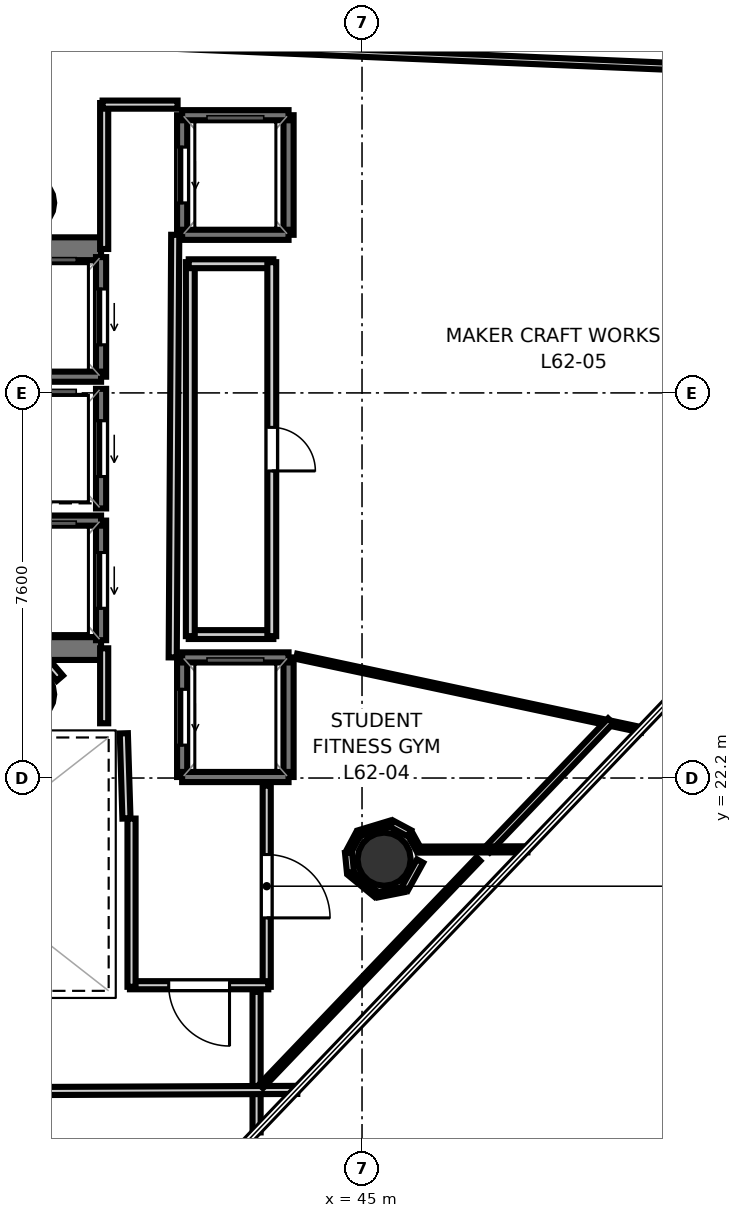
"""IFC4 building model, lengths in metres.
Left out: names, types, materials, properties, quantities, classifications, styles, units other than length and angle.
Written with IfcOpenShell. Run it as: python <this file> out.ifc"""

import sys

from ifc_helpers import new_model, si_unit, direction, frame, frame_2d, origin, origin_2d, place, context, subcontext, project, spatial, rectangle, hollow_circle, extrude, element, fill, save


model = new_model("IFC4")
c1 = context("Model", 3, precision=1e-05, world=origin(), true_north=direction((0.0, 1.0)))
c2 = subcontext(c1, "Body", "Model", "MODEL_VIEW")
j1 = project(units=[si_unit("LENGTHUNIT", "METRE"), si_unit("PLANEANGLEUNIT", "RADIAN")], contexts=[c1])
p1 = place(None, origin())
s1 = spatial("IfcSite", under=j1, at=p1, CompositionType="ELEMENT")
p2 = place(p1, origin())
s2 = spatial("IfcBuilding", under=s1, at=p2, CompositionType="ELEMENT")
p3 = place(p2, frame((0.0, 0.0, 242.7)))
s3 = spatial("IfcBuildingStorey", under=s2, at=p3, CompositionType="ELEMENT", Elevation=242.7)
p4 = place(p3, frame((29.33, 32.645, 0.0), z_axis=(0.0, 0.0, 1.0), x_axis=(1.0, 0.0, 0.0)))
e1 = element("IfcWall", 1, at=p4, inside=s3, PredefinedType="SHEAR", context=c2, shape_type="SweptSolid", body=[
    extrude(rectangle(XDim=10.52, YDim=0.45, at=frame_2d((5.26, 0.0))), origin(), (0.0, 0.0, 1.0), 3.52),
])
p5 = place(p4, frame((0.895, 0.0, 0.0)))
e2 = element("IfcOpeningElement", 2, at=p5, cuts=e1, PredefinedType="OPENING", context=c2, shape_type="SweptSolid", body=[
    extrude(rectangle(XDim=1.25, YDim=2.15, at=frame_2d((0.625, 1.075))), frame((0.0, 0.235, 0.0), z_axis=(0.0, -1.0, 0.0), x_axis=(1.0, 0.0, 0.0)), (0.0, 0.0, 1.0), 0.47),
])
p6 = place(p3, frame((29.33, 24.755, 0.0), z_axis=(0.0, 0.0, 1.0), x_axis=(1.0, 0.0, 0.0)))
e3 = element("IfcWall", 3, at=p6, inside=s3, PredefinedType="SHEAR", context=c2, shape_type="SweptSolid", body=[
    extrude(rectangle(XDim=10.52, YDim=0.45, at=frame_2d((5.26, 0.0))), origin(), (0.0, 0.0, 1.0), 3.52),
])
p7 = place(p6, frame((0.695, 0.0, 0.0)))
e4 = element("IfcOpeningElement", 4, at=p7, cuts=e3, PredefinedType="OPENING", context=c2, shape_type="SweptSolid", body=[
    extrude(rectangle(XDim=1.25, YDim=2.15, at=frame_2d((0.625, 1.075))), frame((0.0, 0.235, 0.0), z_axis=(0.0, -1.0, 0.0), x_axis=(1.0, 0.0, 0.0)), (0.0, 0.0, 1.0), 0.47),
])
for number, where, z_axis, x_axis in (
    (5, (38.4, 33.55, 0.0), (0.0, 0.0, 1.0), (1.0, 0.0, 0.0)),
    (6, (38.4, 23.85, 0.0), (0.0, 0.0, 1.0), (1.0, 0.0, 0.0)),
    (7, (45.436, 20.598, 0.0), (0.0, 0.0, 1.0), (1.0, 0.0, 0.0)),
):
    element("IfcColumn", number, at=place(p3, frame(where, z_axis=z_axis, x_axis=x_axis)), inside=s3, PredefinedType="COLUMN", context=c2, shape_type="SweptSolid", body=[
        extrude(hollow_circle(Radius=0.525, WallThickness=0.028, at=origin_2d()), origin(), (0.0, 0.0, 1.0), 3.7),
    ])
p8 = place(p3, frame((39.85, 30.12, 0.0), z_axis=(0.0, 0.0, 1.0), x_axis=(0.0, 1.0, 0.0)))
e8 = element("IfcWall", 8, at=p8, inside=s3, PredefinedType="SOLIDWALL", context=c2, shape_type="SweptSolid", body=[
    extrude(rectangle(XDim=2.36, YDim=0.2, at=frame_2d((1.18, 0.0))), origin(), (0.0, 0.0, 1.0), 3.52),
])
p9 = place(p8, frame((0.63, 0.0, 0.0)))
e9 = element("IfcOpeningElement", 9, at=p9, cuts=e8, PredefinedType="OPENING", context=c2, shape_type="SweptSolid", body=[
    extrude(rectangle(XDim=1.1, YDim=2.15, at=frame_2d((0.55, 1.075))), frame((0.0, 0.11, 0.0), z_axis=(0.0, -1.0, 0.0), x_axis=(1.0, 0.0, 0.0)), (0.0, 0.0, 1.0), 0.22),
])
p10 = place(p3, frame((37.75, 30.12, 0.0), z_axis=(0.0, 0.0, 1.0), x_axis=(1.0, 0.0, 0.0)))
e10 = element("IfcWall", 10, at=p10, inside=s3, PredefinedType="SOLIDWALL", context=c2, shape_type="SweptSolid", body=[
    extrude(rectangle(XDim=2.1, YDim=0.2, at=frame_2d((1.05, 0.0))), origin(), (0.0, 0.0, 1.0), 3.52),
])
p11 = place(p3, frame((39.85, 24.92, 0.0), z_axis=(0.0, 0.0, 1.0), x_axis=(0.0, 1.0, 0.0)))
e11 = element("IfcWall", 11, at=p11, inside=s3, PredefinedType="SOLIDWALL", context=c2, shape_type="SweptSolid", body=[
    extrude(rectangle(XDim=2.36, YDim=0.2, at=frame_2d((1.18, 0.0))), origin(), (0.0, 0.0, 1.0), 3.52),
])
p12 = place(p11, frame((0.63, 0.0, 0.0)))
e12 = element("IfcOpeningElement", 12, at=p12, cuts=e11, PredefinedType="OPENING", context=c2, shape_type="SweptSolid", body=[
    extrude(rectangle(XDim=1.1, YDim=2.15, at=frame_2d((0.55, 1.075))), frame((0.0, 0.11, 0.0), z_axis=(0.0, -1.0, 0.0), x_axis=(1.0, 0.0, 0.0)), (0.0, 0.0, 1.0), 0.22),
])
p13 = place(p3, frame((37.75, 27.28, 0.0), z_axis=(0.0, 0.0, 1.0), x_axis=(1.0, 0.0, 0.0)))
e13 = element("IfcWall", 13, at=p13, inside=s3, PredefinedType="SOLIDWALL", context=c2, shape_type="SweptSolid", body=[
    extrude(rectangle(XDim=2.1, YDim=0.2, at=frame_2d((1.05, 0.0))), origin(), (0.0, 0.0, 1.0), 3.52),
])
p14 = place(p3, frame((39.85, 27.52, 0.0), z_axis=(0.0, 0.0, 1.0), x_axis=(0.0, 1.0, 0.0)))
e14 = element("IfcWall", 14, at=p14, inside=s3, PredefinedType="SOLIDWALL", context=c2, shape_type="SweptSolid", body=[
    extrude(rectangle(XDim=2.36, YDim=0.2, at=frame_2d((1.18, 0.0))), origin(), (0.0, 0.0, 1.0), 3.52),
])
p15 = place(p14, frame((0.63, 0.0, 0.0)))
e15 = element("IfcOpeningElement", 15, at=p15, cuts=e14, PredefinedType="OPENING", context=c2, shape_type="SweptSolid", body=[
    extrude(rectangle(XDim=1.1, YDim=2.15, at=frame_2d((0.55, 1.075))), frame((0.0, 0.11, 0.0), z_axis=(0.0, -1.0, 0.0), x_axis=(1.0, 0.0, 0.0)), (0.0, 0.0, 1.0), 0.22),
])
p16 = place(p3, frame((43.55, 22.22, 0.0), z_axis=(0.0, 0.0, 1.0), x_axis=(0.0, 1.0, 0.0)))
e16 = element("IfcWall", 16, at=p16, inside=s3, PredefinedType="SOLIDWALL", context=c2, shape_type="SweptSolid", body=[
    extrude(rectangle(XDim=2.36, YDim=0.2, at=frame_2d((1.18, 0.0))), origin(), (0.0, 0.0, 1.0), 3.52),
])
p17 = place(p3, frame((41.45, 22.22, 0.0), z_axis=(0.0, 0.0, 1.0), x_axis=(0.0, 1.0, 0.0)))
e17 = element("IfcWall", 17, at=p17, inside=s3, PredefinedType="SOLIDWALL", context=c2, shape_type="SweptSolid", body=[
    extrude(rectangle(XDim=2.36, YDim=0.2, at=frame_2d((1.18, 0.0))), origin(), (0.0, 0.0, 1.0), 3.52),
])
p18 = place(p17, frame((0.63, 0.0, 0.0)))
e18 = element("IfcOpeningElement", 18, at=p18, cuts=e17, PredefinedType="OPENING", context=c2, shape_type="SweptSolid", body=[
    extrude(rectangle(XDim=1.1, YDim=2.15, at=frame_2d((0.55, 1.075))), frame((0.0, 0.11, 0.0), z_axis=(0.0, -1.0, 0.0), x_axis=(1.0, 0.0, 0.0)), (0.0, 0.0, 1.0), 0.22),
])
for number, where, z_axis, x_axis in (
    (19, (41.45, 24.58, 0.0), (0.0, 0.0, 1.0), (1.0, 0.0, 0.0)),
    (20, (41.45, 22.22, 0.0), (0.0, 0.0, 1.0), (1.0, 0.0, 0.0)),
):
    element("IfcWall", number, at=place(p3, frame(where, z_axis=z_axis, x_axis=x_axis)), inside=s3, PredefinedType="SOLIDWALL", context=c2, shape_type="SweptSolid", body=[
        extrude(rectangle(XDim=2.1, YDim=0.2, at=frame_2d((1.05, 0.0))), origin(), (0.0, 0.0, 1.0), 3.52),
    ])
p19 = place(p3, frame((43.55, 32.92, 0.0), z_axis=(0.0, 0.0, 1.0), x_axis=(0.0, 1.0, 0.0)))
e21 = element("IfcWall", 21, at=p19, inside=s3, PredefinedType="SOLIDWALL", context=c2, shape_type="SweptSolid", body=[
    extrude(rectangle(XDim=2.36, YDim=0.2, at=frame_2d((1.18, 0.0))), origin(), (0.0, 0.0, 1.0), 3.52),
])
p20 = place(p3, frame((41.45, 32.92, 0.0), z_axis=(0.0, 0.0, 1.0), x_axis=(0.0, 1.0, 0.0)))
e22 = element("IfcWall", 22, at=p20, inside=s3, PredefinedType="SOLIDWALL", context=c2, shape_type="SweptSolid", body=[
    extrude(rectangle(XDim=2.36, YDim=0.2, at=frame_2d((1.18, 0.0))), origin(), (0.0, 0.0, 1.0), 3.52),
])
p21 = place(p20, frame((0.63, 0.0, 0.0)))
e23 = element("IfcOpeningElement", 23, at=p21, cuts=e22, PredefinedType="OPENING", context=c2, shape_type="SweptSolid", body=[
    extrude(rectangle(XDim=1.1, YDim=2.15, at=frame_2d((0.55, 1.075))), frame((0.0, 0.11, 0.0), z_axis=(0.0, -1.0, 0.0), x_axis=(1.0, 0.0, 0.0)), (0.0, 0.0, 1.0), 0.22),
])
for number, where, z_axis, x_axis in (
    (24, (41.45, 35.28, 0.0), (0.0, 0.0, 1.0), (1.0, 0.0, 0.0)),
    (25, (41.45, 32.92, 0.0), (0.0, 0.0, 1.0), (1.0, 0.0, 0.0)),
):
    element("IfcWall", number, at=place(p3, frame(where, z_axis=z_axis, x_axis=x_axis)), inside=s3, PredefinedType="SOLIDWALL", context=c2, shape_type="SweptSolid", body=[
        extrude(rectangle(XDim=2.1, YDim=0.2, at=frame_2d((1.05, 0.0))), origin(), (0.0, 0.0, 1.0), 3.52),
    ])
p22 = place(p3, frame((40.351, 21.401, 0.0), z_axis=(0.0, 0.0, 1.0), x_axis=(-0.031058045979, 0.999517582527, 0.0)))
e26 = element("IfcWall", 26, at=p22, inside=s3, PredefinedType="PARTITIONING", context=c2, shape_type="SweptSolid", body=[
    extrude(rectangle(XDim=1.682, YDim=0.16, at=frame_2d((0.841, 0.0))), origin(), (0.0, 0.0, 1.0), 2.84),
])
p23 = place(p3, frame((39.911, 23.28, 0.0), z_axis=(0.0, 0.0, 1.0), x_axis=(0.0, 1.0, 0.0)))
e27 = element("IfcWall", 27, at=p23, inside=s3, PredefinedType="PARTITIONING", context=c2, shape_type="SweptSolid", body=[
    extrude(rectangle(XDim=1.48, YDim=0.16, at=frame_2d((0.74, 0.0))), origin(), (0.0, 0.0, 1.0), 2.84),
])
p24 = place(p3, frame((39.911, 32.64, 0.0), z_axis=(0.0, 0.0, 1.0), x_axis=(0.0, 1.0, 0.0)))
e28 = element("IfcWall", 28, at=p24, inside=s3, PredefinedType="PARTITIONING", context=c2, shape_type="SweptSolid", body=[
    extrude(rectangle(XDim=2.88, YDim=0.16, at=frame_2d((1.44, 0.0))), origin(), (0.0, 0.0, 1.0), 2.84),
])
p25 = place(p3, frame((39.88, 35.489, 0.0), z_axis=(0.0, 0.0, 1.0), x_axis=(1.0, 0.0, 0.0)))
e29 = element("IfcWall", 29, at=p25, inside=s3, PredefinedType="PARTITIONING", context=c2, shape_type="SweptSolid", body=[
    extrude(rectangle(XDim=1.48, YDim=0.16, at=frame_2d((0.74, 0.0))), origin(), (0.0, 0.0, 1.0), 2.84),
])
p26 = place(p3, frame((41.313, 32.92, 0.0), z_axis=(0.0, 0.0, 1.0), x_axis=(-0.005942518022, -0.999982343084, 0.0)))
e30 = element("IfcWall", 30, at=p26, inside=s3, PredefinedType="PARTITIONING", context=c2, shape_type="SweptSolid", body=[
    extrude(rectangle(XDim=8.34, YDim=0.16, at=frame_2d((4.17, 0.0))), origin(), (0.0, 0.0, 1.0), 2.84),
])
p27 = place(p3, frame((43.119, 22.05, 0.0), z_axis=(0.0, 0.0, 1.0), x_axis=(0.0, -1.0, 0.0)))
e31 = element("IfcWall", 31, at=p27, inside=s3, PredefinedType="PARTITIONING", context=c2, shape_type="SweptSolid", body=[
    extrude(rectangle(XDim=3.97, YDim=0.16, at=frame_2d((1.985, 0.0))), origin(), (0.0, 0.0, 1.0), 2.84),
])
p28 = place(p27, frame((1.36, 0.0, 0.0)))
e32 = element("IfcOpeningElement", 32, at=p28, cuts=e31, PredefinedType="OPENING", context=c2, shape_type="SweptSolid", body=[
    extrude(rectangle(XDim=1.25, YDim=2.2, at=frame_2d((0.625, 1.1))), frame((0.0, 0.09, 0.0), z_axis=(0.0, -1.0, 0.0), x_axis=(1.0, 0.0, 0.0)), (0.0, 0.0, 1.0), 0.18),
])
p29 = place(p3, frame((43.15, 18.111, 0.0), z_axis=(0.0, 0.0, 1.0), x_axis=(-1.0, 0.0, 0.0)))
e33 = element("IfcWall", 33, at=p29, inside=s3, PredefinedType="PARTITIONING", context=c2, shape_type="SweptSolid", body=[
    extrude(rectangle(XDim=2.73, YDim=0.16, at=frame_2d((1.365, 0.0))), origin(), (0.0, 0.0, 1.0), 2.84),
])
p30 = place(p29, frame((0.765, 0.0, 0.0)))
e34 = element("IfcOpeningElement", 34, at=p30, cuts=e33, PredefinedType="OPENING", context=c2, shape_type="SweptSolid", body=[
    extrude(rectangle(XDim=1.2, YDim=2.15, at=frame_2d((0.6, 1.075))), frame((0.0, 0.09, 0.0), z_axis=(0.0, -1.0, 0.0), x_axis=(1.0, 0.0, 0.0)), (0.0, 0.0, 1.0), 0.18),
])
p31 = place(p3, frame((40.451, 18.08, 0.0), z_axis=(0.0, 0.0, 1.0), x_axis=(0.0, 1.0, 0.0)))
e35 = element("IfcWall", 35, at=p31, inside=s3, PredefinedType="PARTITIONING", context=c2, shape_type="SweptSolid", body=[
    extrude(rectangle(XDim=3.32, YDim=0.16, at=frame_2d((1.66, 0.0))), origin(), (0.0, 0.0, 1.0), 2.84),
])
p32 = place(p3, frame((43.25, 25.031, 0.0), z_axis=(0.0, 0.0, 1.0), x_axis=(-1.0, 0.0, 0.0)))
e36 = element("IfcWall", 36, at=p32, inside=s3, PredefinedType="PLUMBINGWALL", context=c2, shape_type="SweptSolid", body=[
    extrude(rectangle(XDim=1.67, YDim=0.175, at=frame_2d((0.835, 0.0))), origin(), (0.0, 0.0, 1.0), 2.84),
])
p33 = place(p3, frame((41.611, 25.0, 0.0), z_axis=(0.0, 0.0, 1.0), x_axis=(0.0, 1.0, 0.0)))
e37 = element("IfcWall", 37, at=p33, inside=s3, PredefinedType="PLUMBINGWALL", context=c2, shape_type="SweptSolid", body=[
    extrude(rectangle(XDim=7.38, YDim=0.175, at=frame_2d((3.69, 0.0))), origin(), (0.0, 0.0, 1.0), 2.84),
])
p34 = place(p3, frame((41.58, 32.349, 0.0), z_axis=(0.0, 0.0, 1.0), x_axis=(1.0, 0.0, 0.0)))
e38 = element("IfcWall", 38, at=p34, inside=s3, PredefinedType="PLUMBINGWALL", context=c2, shape_type="SweptSolid", body=[
    extrude(rectangle(XDim=1.67, YDim=0.175, at=frame_2d((0.835, 0.0))), origin(), (0.0, 0.0, 1.0), 2.84),
])
p35 = place(p3, frame((43.219, 32.38, 0.0), z_axis=(0.0, 0.0, 1.0), x_axis=(0.0, -1.0, 0.0)))
e39 = element("IfcWall", 39, at=p35, inside=s3, PredefinedType="PLUMBINGWALL", context=c2, shape_type="SweptSolid", body=[
    extrude(rectangle(XDim=7.38, YDim=0.175, at=frame_2d((3.69, 0.0))), origin(), (0.0, 0.0, 1.0), 2.84),
])
p36 = place(p35, frame((3.26, 0.0, 0.0)))
e40 = element("IfcOpeningElement", 40, at=p36, cuts=e39, PredefinedType="OPENING", context=c2, shape_type="SweptSolid", body=[
    extrude(rectangle(XDim=0.86, YDim=2.05, at=frame_2d((0.43, 1.025))), frame((0.0, 0.097, 0.0), z_axis=(0.0, -1.0, 0.0), x_axis=(1.0, 0.0, 0.0)), (0.0, 0.0, 1.0), 0.195),
])
p37 = place(p3, frame((39.036, 24.17, 0.0), z_axis=(0.0, 0.0, 1.0), x_axis=(-0.652260263346, 0.757995084984, 0.0)))
e41 = element("IfcWall", 41, at=p37, inside=s3, PredefinedType="PARTITIONING", context=c2, shape_type="SweptSolid", body=[
    extrude(rectangle(XDim=0.355, YDim=0.16, at=frame_2d((0.178, 0.0))), origin(), (0.0, 0.0, 1.0), 2.84),
])
p38 = place(p3, frame((42.919, 17.98, 0.0), z_axis=(0.0, 0.0, 1.0), x_axis=(0.0, -1.0, 0.0)))
e42 = element("IfcWall", 42, at=p38, inside=s3, PredefinedType="PARTITIONING", context=c2, shape_type="SweptSolid", body=[
    extrude(rectangle(XDim=2.774, YDim=0.16, at=frame_2d((1.387, 0.0))), origin(), (0.0, 0.0, 1.0), 2.84),
])
p39 = place(p3, frame((43.722, 16.045, 0.0), z_axis=(0.0, 0.0, 1.0), x_axis=(-0.999990917582, -0.004262012887, 0.0)))
e43 = element("IfcWall", 43, at=p39, inside=s3, PredefinedType="PARTITIONING", context=c2, shape_type="SweptSolid", body=[
    extrude(rectangle(XDim=15.123, YDim=0.16, at=frame_2d((7.562, 0.0))), origin(), (0.0, 0.0, 1.0), 2.84),
])
p40 = place(p39, frame((12.611, 0.0, 0.0)))
e44 = element("IfcOpeningElement", 44, at=p40, cuts=e43, PredefinedType="OPENING", context=c2, shape_type="SweptSolid", body=[
    extrude(rectangle(XDim=1.25, YDim=2.2, at=frame_2d((0.625, 1.1))), frame((0.0, 0.09, 0.0), z_axis=(0.0, -1.0, 0.0), x_axis=(1.0, 0.0, 0.0)), (0.0, 0.0, 1.0), 0.18),
])
p41 = place(p39, frame((6.314, 0.0, 0.0)))
e45 = element("IfcOpeningElement", 45, at=p41, cuts=e43, PredefinedType="OPENING", context=c2, shape_type="SweptSolid", body=[
    extrude(rectangle(XDim=1.25, YDim=2.2, at=frame_2d((0.625, 1.1))), frame((0.0, 0.09, 0.0), z_axis=(0.0, -1.0, 0.0), x_axis=(1.0, 0.0, 0.0)), (0.0, 0.0, 1.0), 0.18),
])
p42 = place(p3, frame((43.71, 24.601, 0.0), z_axis=(0.0, 0.0, 1.0), x_axis=(0.978027062603, -0.208477972017, 0.0)))
e46 = element("IfcWall", 46, at=p42, inside=s3, PredefinedType="PARTITIONING", context=c2, shape_type="SweptSolid", body=[
    extrude(rectangle(XDim=6.964, YDim=0.105, at=frame_2d((3.482, 0.0))), origin(), (0.0, 0.0, 1.0), 2.84),
])
p43 = place(p3, frame((49.906, 23.329, 0.0), z_axis=(0.0, 0.0, 1.0), x_axis=(-0.691208491713, -0.722655395735, 0.0)))
e47 = element("IfcWall", 47, at=p43, inside=s3, PredefinedType="PARTITIONING", context=c2, shape_type="SweptSolid", body=[
    extrude(rectangle(XDim=3.525, YDim=0.14, at=frame_2d((1.762, 0.0))), origin(), (0.0, 0.0, 1.0), 2.84),
])
p44 = place(p3, frame((48.264, 20.793, 0.0), z_axis=(0.0, 0.0, 1.0), x_axis=(-0.999996918587, -0.002482501942, 0.0)))
e48 = element("IfcWall", 48, at=p44, inside=s3, PredefinedType="PARTITIONING", context=c2, shape_type="SweptSolid", body=[
    extrude(rectangle(XDim=2.164, YDim=0.12, at=frame_2d((1.082, 0.0))), origin(), (0.0, 0.0, 1.0), 2.84),
])
p45 = place(p3, frame((46.127, 20.771, 0.0), z_axis=(0.0, 0.0, 1.0), x_axis=(-0.483302691899, 0.875453315719, 0.0)))
e49 = element("IfcWall", 49, at=p45, inside=s3, PredefinedType="PARTITIONING", context=c2, shape_type="SweptSolid", body=[
    extrude(rectangle(XDim=0.372, YDim=0.105, at=frame_2d((0.186, 0.0))), origin(), (0.0, 0.0, 1.0), 2.84),
])
p46 = place(p3, frame((45.935, 21.11, 0.0), z_axis=(0.0, 0.0, 1.0), x_axis=(-0.881944865518, 0.471352579484, 0.0)))
e50 = element("IfcWall", 50, at=p46, inside=s3, PredefinedType="PARTITIONING", context=c2, shape_type="SweptSolid", body=[
    extrude(rectangle(XDim=0.398, YDim=0.14, at=frame_2d((0.199, 0.0))), origin(), (0.0, 0.0, 1.0), 2.84),
])
p47 = place(p3, frame((45.561, 21.3, 0.0), z_axis=(0.0, 0.0, 1.0), x_axis=(-0.956916224704, -0.290364148784, 0.0)))
e51 = element("IfcWall", 51, at=p47, inside=s3, PredefinedType="PARTITIONING", context=c2, shape_type="SweptSolid", body=[
    extrude(rectangle(XDim=0.646, YDim=0.12, at=frame_2d((0.323, 0.0))), origin(), (0.0, 0.0, 1.0), 2.84),
])
p48 = place(p3, frame((44.924, 21.097, 0.0), z_axis=(0.0, 0.0, 1.0), x_axis=(-0.471607834051, -0.881808398044, 0.0)))
e52 = element("IfcWall", 52, at=p48, inside=s3, PredefinedType="PARTITIONING", context=c2, shape_type="SweptSolid", body=[
    extrude(rectangle(XDim=0.397, YDim=0.105, at=frame_2d((0.199, 0.0))), origin(), (0.0, 0.0, 1.0), 2.84),
])
p49 = place(p3, frame((44.733, 20.729, 0.0), z_axis=(0.0, 0.0, 1.0), x_axis=(0.097619118958, -0.995223847993, 0.0)))
e53 = element("IfcWall", 53, at=p49, inside=s3, PredefinedType="PARTITIONING", context=c2, shape_type="SweptSolid", body=[
    extrude(rectangle(XDim=0.398, YDim=0.14, at=frame_2d((0.199, 0.0))), origin(), (0.0, 0.0, 1.0), 2.84),
])
p50 = place(p3, frame((44.783, 20.312, 0.0), z_axis=(0.0, 0.0, 1.0), x_axis=(0.772878500367, -0.634554035265, 0.0)))
e54 = element("IfcWall", 54, at=p50, inside=s3, PredefinedType="PARTITIONING", context=c2, shape_type="SweptSolid", body=[
    extrude(rectangle(XDim=0.646, YDim=0.12, at=frame_2d((0.323, 0.0))), origin(), (0.0, 0.0, 1.0), 2.84),
])
p51 = place(p3, frame((45.308, 19.896, 0.0), z_axis=(0.0, 0.0, 1.0), x_axis=(0.98077721036, 0.195130888481, 0.0)))
e55 = element("IfcWall", 55, at=p51, inside=s3, PredefinedType="PARTITIONING", context=c2, shape_type="SweptSolid", body=[
    extrude(rectangle(XDim=0.524, YDim=0.105, at=frame_2d((0.262, 0.0))), origin(), (0.0, 0.0, 1.0), 2.84),
])
p52 = place(p3, frame((45.844, 20.013, 0.0), z_axis=(0.0, 0.0, 1.0), x_axis=(0.482891725637, 0.875680067896, 0.0)))
e56 = element("IfcWall", 56, at=p52, inside=s3, PredefinedType="PARTITIONING", context=c2, shape_type="SweptSolid", body=[
    extrude(rectangle(XDim=0.626, YDim=0.14, at=frame_2d((0.313, 0.0))), origin(), (0.0, 0.0, 1.0), 2.84),
])
p53 = place(p3, frame((47.298, 20.601, 0.0), z_axis=(0.0, 0.0, 1.0), x_axis=(-0.691236936223, -0.722628187937, 0.0)))
e57 = element("IfcWall", 57, at=p53, inside=s3, PredefinedType="PARTITIONING", context=c2, shape_type="SweptSolid", body=[
    extrude(rectangle(XDim=6.206, YDim=0.105, at=frame_2d((3.103, 0.0))), origin(), (0.0, 0.0, 1.0), 2.84),
])
p54 = place(p3, frame((22.507, 37.459, 0.0), z_axis=(0.0, 0.0, 1.0), x_axis=(0.999098166192, -0.042460031931, 0.0)))
e58 = element("IfcWall", 58, at=p54, inside=s3, PredefinedType="PARTITIONING", context=c2, shape_type="SweptSolid", body=[
    extrude(rectangle(XDim=34.609, YDim=0.14, at=frame_2d((17.304, 0.0))), origin(), (0.0, 0.0, 1.0), 2.84),
])
p55 = place(p9, origin())
e59 = element("IfcDoor", 59, at=p55, inside=s3, OperationType="SLIDING_TO_LEFT", PredefinedType="DOOR", context=c2, shape_type="SweptSolid", body=[
    extrude(rectangle(XDim=1.1, YDim=2.15, at=frame_2d((0.55, 1.075))), frame((0.0, 0.025, 0.0), z_axis=(0.0, -1.0, 0.0), x_axis=(1.0, 0.0, 0.0)), (0.0, 0.0, 1.0), 0.05),
])
fill(e9, e59)
p56 = place(p12, origin())
e60 = element("IfcDoor", 60, at=p56, inside=s3, OperationType="SLIDING_TO_LEFT", PredefinedType="DOOR", context=c2, shape_type="SweptSolid", body=[
    extrude(rectangle(XDim=1.1, YDim=2.15, at=frame_2d((0.55, 1.075))), frame((0.0, 0.025, 0.0), z_axis=(0.0, -1.0, 0.0), x_axis=(1.0, 0.0, 0.0)), (0.0, 0.0, 1.0), 0.05),
])
fill(e12, e60)
p57 = place(p15, origin())
e61 = element("IfcDoor", 61, at=p57, inside=s3, OperationType="SLIDING_TO_LEFT", PredefinedType="DOOR", context=c2, shape_type="SweptSolid", body=[
    extrude(rectangle(XDim=1.1, YDim=2.15, at=frame_2d((0.55, 1.075))), frame((0.0, 0.025, 0.0), z_axis=(0.0, -1.0, 0.0), x_axis=(1.0, 0.0, 0.0)), (0.0, 0.0, 1.0), 0.05),
])
fill(e15, e61)
p58 = place(p18, origin())
e62 = element("IfcDoor", 62, at=p58, inside=s3, OperationType="SLIDING_TO_LEFT", PredefinedType="DOOR", context=c2, shape_type="SweptSolid", body=[
    extrude(rectangle(XDim=1.1, YDim=2.15, at=frame_2d((0.55, 1.075))), frame((0.0, 0.025, 0.0), z_axis=(0.0, -1.0, 0.0), x_axis=(1.0, 0.0, 0.0)), (0.0, 0.0, 1.0), 0.05),
])
fill(e18, e62)
p59 = place(p21, origin())
e63 = element("IfcDoor", 63, at=p59, inside=s3, OperationType="SLIDING_TO_LEFT", PredefinedType="DOOR", context=c2, shape_type="SweptSolid", body=[
    extrude(rectangle(XDim=1.1, YDim=2.15, at=frame_2d((0.55, 1.075))), frame((0.0, 0.025, 0.0), z_axis=(0.0, -1.0, 0.0), x_axis=(1.0, 0.0, 0.0)), (0.0, 0.0, 1.0), 0.05),
])
fill(e23, e63)
p60 = place(p30, origin())
e64 = element("IfcDoor", 64, at=p60, inside=s3, OperationType="SINGLE_SWING_LEFT", PredefinedType="DOOR", context=c2, shape_type="SweptSolid", body=[
    extrude(rectangle(XDim=1.2, YDim=2.15, at=frame_2d((0.6, 1.075))), frame((0.0, 0.025, 0.0), z_axis=(0.0, -1.0, 0.0), x_axis=(1.0, 0.0, 0.0)), (0.0, 0.0, 1.0), 0.05),
])
fill(e34, e64)
p61 = place(p28, origin())
e65 = element("IfcDoor", 65, at=p61, inside=s3, OperationType="SINGLE_SWING_RIGHT", PredefinedType="DOOR", context=c2, shape_type="SweptSolid", body=[
    extrude(rectangle(XDim=1.25, YDim=2.2, at=frame_2d((0.625, 1.1))), frame((0.0, 0.025, 0.0), z_axis=(0.0, -1.0, 0.0), x_axis=(1.0, 0.0, 0.0)), (0.0, 0.0, 1.0), 0.05),
])
fill(e32, e65)
p62 = place(p36, origin())
e66 = element("IfcDoor", 66, at=p62, inside=s3, OperationType="SINGLE_SWING_RIGHT", PredefinedType="DOOR", context=c2, shape_type="SweptSolid", body=[
    extrude(rectangle(XDim=0.86, YDim=2.05, at=frame_2d((0.43, 1.025))), frame((0.0, 0.025, 0.0), z_axis=(0.0, -1.0, 0.0), x_axis=(1.0, 0.0, 0.0)), (0.0, 0.0, 1.0), 0.05),
])
fill(e40, e66)
save(model, sys.argv[1])
